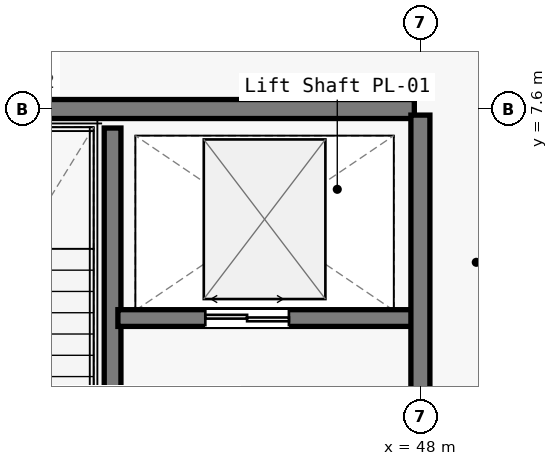
"""IFC4 building model, lengths in metres.
Left out: names, types, materials, properties, quantities, classifications, styles, units other than length and angle.
Written with IfcOpenShell. Run it as: python <this file> out.ifc"""

import sys

from ifc_helpers import new_model, si_unit, direction, frame, frame_2d, origin, place, context, subcontext, project, spatial, rectangle, extrude, element, fill, save


model = new_model("IFC4")
c1 = context("Model", 3, precision=1e-05, world=origin(), true_north=direction((0.0, 1.0)))
c2 = subcontext(c1, "Body", "Model", "MODEL_VIEW")
j1 = project(units=[si_unit("LENGTHUNIT", "METRE"), si_unit("PLANEANGLEUNIT", "RADIAN")], contexts=[c1])
p1 = place(None, origin())
s1 = spatial("IfcSite", under=j1, at=p1, CompositionType="ELEMENT")
p2 = place(p1, origin())
s2 = spatial("IfcBuilding", under=s1, at=p2, CompositionType="ELEMENT")
p3 = place(p2, origin())
s3 = spatial("IfcBuildingStorey", under=s2, at=p3, CompositionType="ELEMENT", Elevation=0.0)
p4 = place(p3, frame((40.15, 7.6, 0.0), z_axis=(0.0, 0.0, 1.0), x_axis=(1.0, 0.0, 0.0)))
e1 = element("IfcWall", 1, at=p4, inside=s3, PredefinedType="SOLIDWALL", context=c2, shape_type="SweptSolid", body=[
    extrude(rectangle(XDim=7.77, YDim=0.25, at=frame_2d((3.885, 0.0))), origin(), (0.0, 0.0, 1.0), 3.99),
])
p5 = place(p3, frame((43.95, 0.25, 0.0), z_axis=(0.0, 0.0, 1.0), x_axis=(0.0, 1.0, 0.0)))
e2 = element("IfcWall", 2, at=p5, inside=s3, PredefinedType="SOLIDWALL", context=c2, shape_type="SweptSolid", body=[
    extrude(rectangle(XDim=7.1, YDim=0.22, at=frame_2d((3.55, 0.0))), origin(), (0.0, 0.0, 1.0), 5.1),
])
p6 = place(p5, frame((0.35, 0.0, 0.0)))
e3 = element("IfcOpeningElement", 3, at=p6, cuts=e2, PredefinedType="OPENING", context=c2, shape_type="SweptSolid", body=[
    extrude(rectangle(XDim=1.2, YDim=2.15, at=frame_2d((0.6, 1.075))), frame((0.0, 0.12, 0.0), z_axis=(0.0, -1.0, 0.0), x_axis=(1.0, 0.0, 0.0)), (0.0, 0.0, 1.0), 0.24),
])
p7 = place(p3, frame((44.02, 4.85, 0.0), z_axis=(0.0, 0.0, 1.0), x_axis=(1.0, 0.0, 0.0)))
e4 = element("IfcWall", 4, at=p7, inside=s3, PredefinedType="SOLIDWALL", context=c2, shape_type="SweptSolid", body=[
    extrude(rectangle(XDim=3.93, YDim=0.22, at=frame_2d((1.965, 0.0))), origin(), (0.0, 0.0, 1.0), 4.485),
])
p8 = place(p7, frame((1.15, 0.0, 0.0)))
e5 = element("IfcOpeningElement", 5, at=p8, cuts=e4, PredefinedType="OPENING", context=c2, shape_type="SweptSolid", body=[
    extrude(rectangle(XDim=1.1, YDim=2.2, at=frame_2d((0.55, 1.1))), frame((0.0, 0.12, 0.0), z_axis=(0.0, -1.0, 0.0), x_axis=(1.0, 0.0, 0.0)), (0.0, 0.0, 1.0), 0.24),
])
p9 = place(p3, frame((48.0, 0.08, 0.0), z_axis=(0.0, 0.0, 1.0), x_axis=(0.0, 1.0, 0.0)))
e6 = element("IfcWall", 6, at=p9, inside=s3, PredefinedType="SOLIDWALL", context=c2, shape_type="SweptSolid", body=[
    extrude(rectangle(XDim=7.44, YDim=0.25, at=frame_2d((3.72, 0.0))), origin(), (0.0, 0.0, 1.0), 3.99),
])
p10 = place(p9, frame((2.27, 0.0, 0.0)))
e7 = element("IfcOpeningElement", 7, at=p10, cuts=e6, PredefinedType="OPENING", context=c2, shape_type="SweptSolid", body=[
    extrude(rectangle(XDim=1.35, YDim=2.2, at=frame_2d((0.675, 1.1))), frame((0.0, 0.135, 0.0), z_axis=(0.0, -1.0, 0.0), x_axis=(1.0, 0.0, 0.0)), (0.0, 0.0, 1.0), 0.27),
])
p11 = place(p8, origin())
e8 = element("IfcDoor", 8, at=p11, inside=s3, OperationType="DOUBLE_DOOR_SLIDING", PredefinedType="DOOR", context=c2, shape_type="SweptSolid", body=[
    extrude(rectangle(XDim=1.1, YDim=2.2, at=frame_2d((0.55, 1.1))), frame((0.0, 0.025, 0.0), z_axis=(0.0, -1.0, 0.0), x_axis=(1.0, 0.0, 0.0)), (0.0, 0.0, 1.0), 0.05),
])
fill(e5, e8)
save(model, sys.argv[1])
